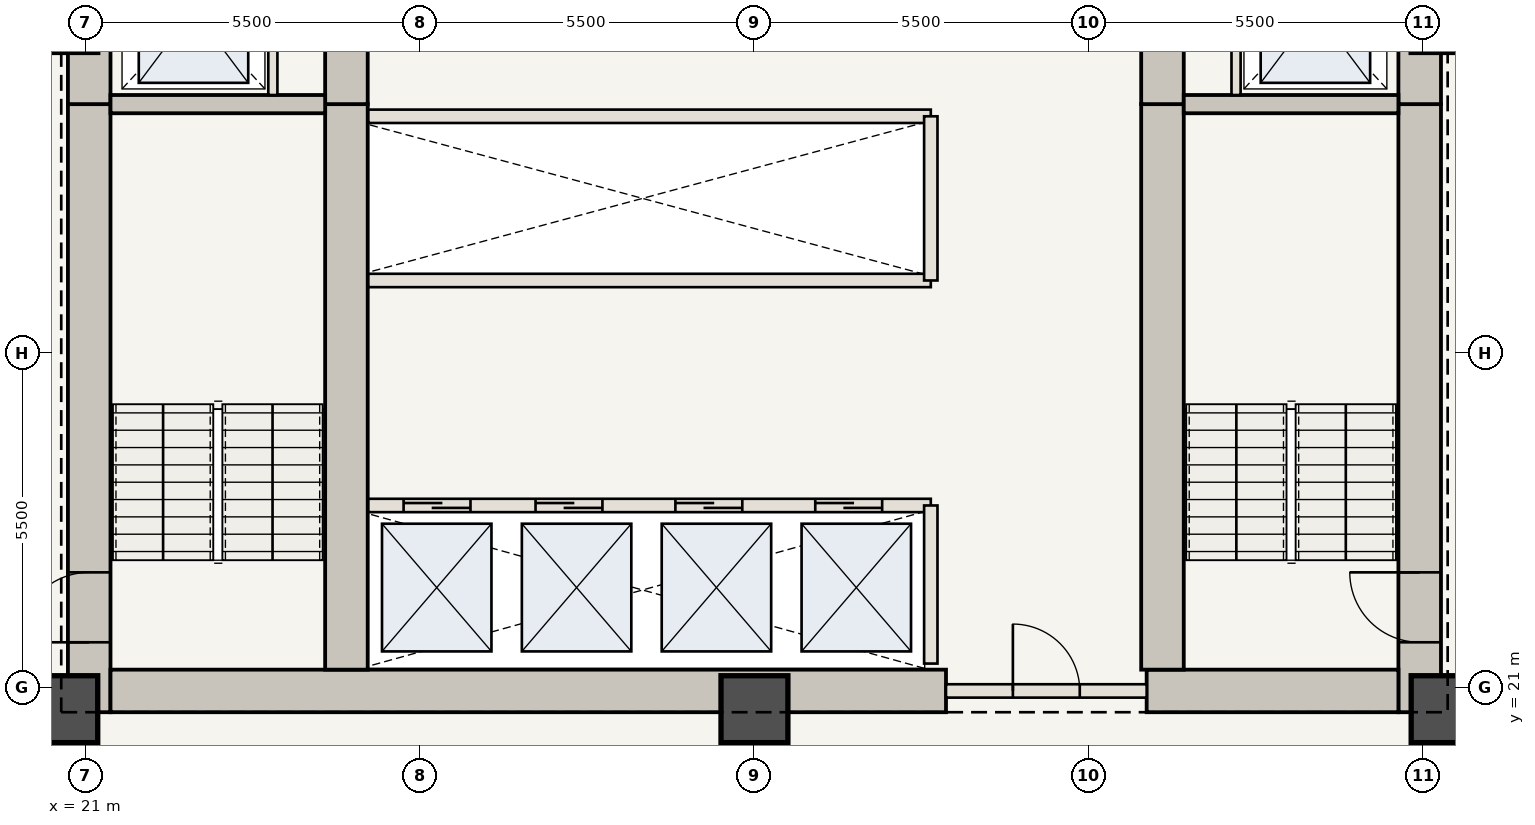
"""IFC4 building model, lengths in metres.
Left out: names, types, materials, properties, quantities, classifications, styles, units other than length and angle.
Written with IfcOpenShell. Run it as: python <this file> out.ifc"""

import sys

from ifc_helpers import new_model, si_unit, direction, frame, frame_2d, origin, origin_2d, place, context, subcontext, project, spatial, rectangle, extrude, element, fill, save


model = new_model("IFC4")
c1 = context("Model", 3, precision=1e-05, world=origin(), true_north=direction((0.0, 1.0)))
c2 = subcontext(c1, "Body", "Model", "MODEL_VIEW")
j1 = project(units=[si_unit("LENGTHUNIT", "METRE"), si_unit("PLANEANGLEUNIT", "RADIAN")], contexts=[c1])
p1 = place(None, origin())
s1 = spatial("IfcSite", under=j1, at=p1, CompositionType="ELEMENT")
p2 = place(p1, origin())
s2 = spatial("IfcBuilding", under=s1, at=p2, CompositionType="ELEMENT")
p3 = place(p2, frame((0.0, 0.0, 45.85)))
s3 = spatial("IfcBuildingStorey", under=s2, at=p3, CompositionType="ELEMENT", Elevation=45.85)
p4 = place(p3, frame((21.06, 20.6, 0.0), z_axis=(0.0, 0.0, 1.0), x_axis=(0.0, 1.0, 0.0)))
e1 = element("IfcWall", 1, at=p4, inside=s3, PredefinedType="SHEAR", context=c2, shape_type="SweptSolid", body=[
    extrude(rectangle(XDim=10.0, YDim=0.7, at=frame_2d((5.0, 0.0))), origin(), (0.0, 0.0, 1.0), 3.5),
])
p5 = place(p4, frame((1.15, 0.0, 0.0)))
e2 = element("IfcOpeningElement", 2, at=p5, cuts=e1, PredefinedType="OPENING", context=c2, shape_type="SweptSolid", body=[
    extrude(rectangle(XDim=1.15, YDim=2.15, at=frame_2d((0.575, 1.075))), frame((0.0, 0.36, 0.0), z_axis=(0.0, -1.0, 0.0), x_axis=(1.0, 0.0, 0.0)), (0.0, 0.0, 1.0), 0.72),
])
p6 = place(p3, frame((21.06, 30.6, 0.0), z_axis=(0.0, 0.0, 1.0), x_axis=(0.0, 1.0, 0.0)))
e3 = element("IfcWall", 3, at=p6, inside=s3, PredefinedType="SHEAR", context=c2, shape_type="SweptSolid", body=[
    extrude(rectangle(XDim=12.75, YDim=0.7, at=frame_2d((6.375, 0.0))), origin(), (0.0, 0.0, 1.0), 3.5),
])
p7 = place(p6, frame((4.2, 0.0, 0.0)))
e4 = element("IfcOpeningElement", 4, at=p7, cuts=e3, PredefinedType="OPENING", context=c2, shape_type="SweptSolid", body=[
    extrude(rectangle(XDim=1.1, YDim=2.15, at=frame_2d((0.55, 1.075))), frame((0.0, 0.36, 0.0), z_axis=(0.0, -1.0, 0.0), x_axis=(1.0, 0.0, 0.0)), (0.0, 0.0, 1.0), 0.72),
])
p8 = place(p6, frame((8.05, 0.0, 0.0)))
e5 = element("IfcOpeningElement", 5, at=p8, cuts=e3, PredefinedType="OPENING", context=c2, shape_type="SweptSolid", body=[
    extrude(rectangle(XDim=0.92, YDim=2.1, at=frame_2d((0.46, 1.05))), frame((0.0, 0.36, 0.0), z_axis=(0.0, -1.0, 0.0), x_axis=(1.0, 0.0, 0.0)), (0.0, 0.0, 1.0), 0.72),
])
p9 = place(p6, frame((9.45, 0.0, 0.0)))
e6 = element("IfcOpeningElement", 6, at=p9, cuts=e3, PredefinedType="OPENING", context=c2, shape_type="SweptSolid", body=[
    extrude(rectangle(XDim=0.88, YDim=2.1, at=frame_2d((0.44, 1.05))), frame((0.0, 0.36, 0.0), z_axis=(0.0, -1.0, 0.0), x_axis=(1.0, 0.0, 0.0)), (0.0, 0.0, 1.0), 0.72),
])
p10 = place(p6, frame((10.85, 0.0, 0.0)))
e7 = element("IfcOpeningElement", 7, at=p10, cuts=e3, PredefinedType="OPENING", context=c2, shape_type="SweptSolid", body=[
    extrude(rectangle(XDim=0.88, YDim=2.1, at=frame_2d((0.44, 1.05))), frame((0.0, 0.36, 0.0), z_axis=(0.0, -1.0, 0.0), x_axis=(1.0, 0.0, 0.0)), (0.0, 0.0, 1.0), 0.72),
])
p11 = place(p3, frame((42.94, 20.6, 0.0), z_axis=(0.0, 0.0, 1.0), x_axis=(0.0, 1.0, 0.0)))
e8 = element("IfcWall", 8, at=p11, inside=s3, PredefinedType="SHEAR", context=c2, shape_type="SweptSolid", body=[
    extrude(rectangle(XDim=10.0, YDim=0.7, at=frame_2d((5.0, 0.0))), origin(), (0.0, 0.0, 1.0), 3.5),
])
p12 = place(p11, frame((1.15, 0.0, 0.0)))
e9 = element("IfcOpeningElement", 9, at=p12, cuts=e8, PredefinedType="OPENING", context=c2, shape_type="SweptSolid", body=[
    extrude(rectangle(XDim=1.15, YDim=2.15, at=frame_2d((0.575, 1.075))), frame((0.0, 0.36, 0.0), z_axis=(0.0, -1.0, 0.0), x_axis=(1.0, 0.0, 0.0)), (0.0, 0.0, 1.0), 0.72),
])
p13 = place(p3, frame((42.94, 30.6, 0.0), z_axis=(0.0, 0.0, 1.0), x_axis=(0.0, 1.0, 0.0)))
e10 = element("IfcWall", 10, at=p13, inside=s3, PredefinedType="SHEAR", context=c2, shape_type="SweptSolid", body=[
    extrude(rectangle(XDim=12.75, YDim=0.7, at=frame_2d((6.375, 0.0))), origin(), (0.0, 0.0, 1.0), 3.5),
])
p14 = place(p13, frame((4.2, 0.0, 0.0)))
e11 = element("IfcOpeningElement", 11, at=p14, cuts=e10, PredefinedType="OPENING", context=c2, shape_type="SweptSolid", body=[
    extrude(rectangle(XDim=1.1, YDim=2.15, at=frame_2d((0.55, 1.075))), frame((0.0, 0.36, 0.0), z_axis=(0.0, -1.0, 0.0), x_axis=(1.0, 0.0, 0.0)), (0.0, 0.0, 1.0), 0.72),
])
p15 = place(p13, frame((9.2, 0.0, 0.0)))
e12 = element("IfcOpeningElement", 12, at=p15, cuts=e10, PredefinedType="OPENING", context=c2, shape_type="SweptSolid", body=[
    extrude(rectangle(XDim=0.92, YDim=2.1, at=frame_2d((0.46, 1.05))), frame((0.0, 0.36, 0.0), z_axis=(0.0, -1.0, 0.0), x_axis=(1.0, 0.0, 0.0)), (0.0, 0.0, 1.0), 0.72),
])
p16 = place(p3, frame((21.41, 20.95, 0.0), z_axis=(0.0, 0.0, 1.0), x_axis=(1.0, 0.0, 0.0)))
e13 = element("IfcWall", 13, at=p16, inside=s3, PredefinedType="SHEAR", context=c2, shape_type="SweptSolid", body=[
    extrude(rectangle(XDim=13.74, YDim=0.7, at=frame_2d((6.87, 0.0))), origin(), (0.0, 0.0, 1.0), 3.5),
])
p17 = place(p3, frame((38.45, 20.95, 0.0), z_axis=(0.0, 0.0, 1.0), x_axis=(1.0, 0.0, 0.0)))
e14 = element("IfcWall", 14, at=p17, inside=s3, PredefinedType="SHEAR", context=c2, shape_type="SweptSolid", body=[
    extrude(rectangle(XDim=4.14, YDim=0.7, at=frame_2d((2.07, 0.0))), origin(), (0.0, 0.0, 1.0), 3.5),
])
p18 = place(p3, frame((25.29, 21.3, 0.0), z_axis=(0.0, 0.0, 1.0), x_axis=(0.0, 1.0, 0.0)))
e15 = element("IfcWall", 15, at=p18, inside=s3, PredefinedType="SHEAR", context=c2, shape_type="SweptSolid", body=[
    extrude(rectangle(XDim=9.3, YDim=0.7, at=frame_2d((4.65, 0.0))), origin(), (0.0, 0.0, 1.0), 3.5),
])
p19 = place(p3, frame((25.29, 30.6, 0.0), z_axis=(0.0, 0.0, 1.0), x_axis=(0.0, 1.0, 0.0)))
e16 = element("IfcWall", 16, at=p19, inside=s3, PredefinedType="SHEAR", context=c2, shape_type="SweptSolid", body=[
    extrude(rectangle(XDim=12.05, YDim=0.7, at=frame_2d((6.025, 0.0))), origin(), (0.0, 0.0, 1.0), 3.5),
])
p20 = place(p19, frame((6.25, 0.0, 0.0)))
e17 = element("IfcOpeningElement", 17, at=p20, cuts=e16, PredefinedType="OPENING", context=c2, shape_type="SweptSolid", body=[
    extrude(rectangle(XDim=1.1, YDim=2.15, at=frame_2d((0.55, 1.075))), frame((0.0, 0.36, 0.0), z_axis=(0.0, -1.0, 0.0), x_axis=(1.0, 0.0, 0.0)), (0.0, 0.0, 1.0), 0.72),
])
p21 = place(p3, frame((38.71, 21.3, 0.0), z_axis=(0.0, 0.0, 1.0), x_axis=(0.0, 1.0, 0.0)))
e18 = element("IfcWall", 18, at=p21, inside=s3, PredefinedType="SHEAR", context=c2, shape_type="SweptSolid", body=[
    extrude(rectangle(XDim=9.3, YDim=0.7, at=frame_2d((4.65, 0.0))), origin(), (0.0, 0.0, 1.0), 3.5),
])
p22 = place(p3, frame((38.71, 30.6, 0.0), z_axis=(0.0, 0.0, 1.0), x_axis=(0.0, 1.0, 0.0)))
e19 = element("IfcWall", 19, at=p22, inside=s3, PredefinedType="SHEAR", context=c2, shape_type="SweptSolid", body=[
    extrude(rectangle(XDim=12.05, YDim=0.7, at=frame_2d((6.025, 0.0))), origin(), (0.0, 0.0, 1.0), 3.5),
])
for number, where, z_axis, x_axis in (
    (20, (20.65, 20.65, 0.0), (0.0, 0.0, 1.0), (1.0, 0.0, 0.0)),
    (21, (32.0, 20.65, 0.0), (0.0, 0.0, 1.0), (1.0, 0.0, 0.0)),
    (22, (43.35, 20.65, 0.0), (0.0, 0.0, 1.0), (1.0, 0.0, 0.0)),
):
    element("IfcColumn", number, at=place(p3, frame(where, z_axis=z_axis, x_axis=x_axis)), inside=s3, PredefinedType="COLUMN", context=c2, shape_type="SweptSolid", body=[
        extrude(rectangle(XDim=1.1, YDim=1.1, at=origin_2d()), origin(), (0.0, 0.0, 1.0), 3.5),
    ])
for number, where, z_axis, x_axis in (
    (23, (21.41, 30.6, 0.0), (0.0, 0.0, 1.0), (1.0, 0.0, 0.0)),
    (24, (39.06, 30.6, 0.0), (0.0, 0.0, 1.0), (1.0, 0.0, 0.0)),
):
    element("IfcWall", number, at=place(p3, frame(where, z_axis=z_axis, x_axis=x_axis)), inside=s3, PredefinedType="SHEAR", context=c2, shape_type="SweptSolid", body=[
        extrude(rectangle(XDim=3.53, YDim=0.3, at=frame_2d((1.765, 0.0))), origin(), (0.0, 0.0, 1.0), 3.32),
    ])
for number, where, z_axis, x_axis in (
    (25, (24.08, 30.75, 0.0), (0.0, 0.0, 1.0), (0.0, 1.0, 0.0)),
    (26, (39.92, 30.75, 0.0), (0.0, 0.0, 1.0), (0.0, 1.0, 0.0)),
):
    element("IfcWall", number, at=place(p3, frame(where, z_axis=z_axis, x_axis=x_axis)), inside=s3, PredefinedType="STANDARD", context=c2, shape_type="SweptSolid", body=[
        extrude(rectangle(XDim=2.65, YDim=0.15, at=frame_2d((1.325, 0.0))), origin(), (0.0, 0.0, 1.0), 3.32),
    ])
p23 = place(p3, frame((35.15, 20.95, 0.0), z_axis=(0.0, 0.0, 1.0), x_axis=(1.0, 0.0, 0.0)))
e27 = element("IfcWall", 27, at=p23, inside=s3, PredefinedType="STANDARD", context=c2, shape_type="SweptSolid", body=[
    extrude(rectangle(XDim=3.3, YDim=0.22, at=frame_2d((1.65, 0.0))), origin(), (0.0, 0.0, 1.0), 3.32),
])
p24 = place(p23, frame((1.1, 0.0, 0.0)))
e28 = element("IfcOpeningElement", 28, at=p24, cuts=e27, PredefinedType="OPENING", context=c2, shape_type="SweptSolid", body=[
    extrude(rectangle(XDim=1.1, YDim=2.15, at=frame_2d((0.55, 1.075))), frame((0.0, 0.12, 0.0), z_axis=(0.0, -1.0, 0.0), x_axis=(1.0, 0.0, 0.0)), (0.0, 0.0, 1.0), 0.24),
])
p25 = place(p3, frame((25.65, 24.0, 0.0), z_axis=(0.0, 0.0, 1.0), x_axis=(1.0, 0.0, 0.0)))
e29 = element("IfcWall", 29, at=p25, inside=s3, PredefinedType="STANDARD", context=c2, shape_type="SweptSolid", body=[
    extrude(rectangle(XDim=9.25, YDim=0.22, at=frame_2d((4.625, 0.0))), origin(), (0.0, 0.0, 1.0), 3.32),
])
p26 = place(p25, frame((0.58, 0.0, 0.0)))
e30 = element("IfcOpeningElement", 30, at=p26, cuts=e29, PredefinedType="OPENING", context=c2, shape_type="SweptSolid", body=[
    extrude(rectangle(XDim=1.1, YDim=2.15, at=frame_2d((0.55, 1.075))), frame((0.0, 0.12, 0.0), z_axis=(0.0, -1.0, 0.0), x_axis=(1.0, 0.0, 0.0)), (0.0, 0.0, 1.0), 0.24),
])
p27 = place(p25, frame((2.75, 0.0, 0.0)))
e31 = element("IfcOpeningElement", 31, at=p27, cuts=e29, PredefinedType="OPENING", context=c2, shape_type="SweptSolid", body=[
    extrude(rectangle(XDim=1.1, YDim=2.15, at=frame_2d((0.55, 1.075))), frame((0.0, 0.12, 0.0), z_axis=(0.0, -1.0, 0.0), x_axis=(1.0, 0.0, 0.0)), (0.0, 0.0, 1.0), 0.24),
])
p28 = place(p25, frame((5.05, 0.0, 0.0)))
e32 = element("IfcOpeningElement", 32, at=p28, cuts=e29, PredefinedType="OPENING", context=c2, shape_type="SweptSolid", body=[
    extrude(rectangle(XDim=1.1, YDim=2.15, at=frame_2d((0.55, 1.075))), frame((0.0, 0.12, 0.0), z_axis=(0.0, -1.0, 0.0), x_axis=(1.0, 0.0, 0.0)), (0.0, 0.0, 1.0), 0.24),
])
p29 = place(p25, frame((7.35, 0.0, 0.0)))
e33 = element("IfcOpeningElement", 33, at=p29, cuts=e29, PredefinedType="OPENING", context=c2, shape_type="SweptSolid", body=[
    extrude(rectangle(XDim=1.1, YDim=2.15, at=frame_2d((0.55, 1.075))), frame((0.0, 0.12, 0.0), z_axis=(0.0, -1.0, 0.0), x_axis=(1.0, 0.0, 0.0)), (0.0, 0.0, 1.0), 0.24),
])
p30 = place(p3, frame((34.9, 21.4, 0.0), z_axis=(0.0, 0.0, 1.0), x_axis=(0.0, 1.0, 0.0)))
e34 = element("IfcWall", 34, at=p30, inside=s3, PredefinedType="STANDARD", context=c2, shape_type="SweptSolid", body=[
    extrude(rectangle(XDim=2.6, YDim=0.22, at=frame_2d((1.3, 0.0))), origin(), (0.0, 0.0, 1.0), 3.32),
])
for number, where, z_axis, x_axis in (
    (35, (25.65, 27.7, 0.0), (0.0, 0.0, 1.0), (1.0, 0.0, 0.0)),
    (36, (25.65, 30.4, 0.0), (0.0, 0.0, 1.0), (1.0, 0.0, 0.0)),
):
    element("IfcWall", number, at=place(p3, frame(where, z_axis=z_axis, x_axis=x_axis)), inside=s3, PredefinedType="STANDARD", context=c2, shape_type="SweptSolid", body=[
        extrude(rectangle(XDim=9.25, YDim=0.22, at=frame_2d((4.625, 0.0))), origin(), (0.0, 0.0, 1.0), 3.32),
    ])
p31 = place(p3, frame((34.9, 27.7, 0.0), z_axis=(0.0, 0.0, 1.0), x_axis=(0.0, 1.0, 0.0)))
e37 = element("IfcWall", 37, at=p31, inside=s3, PredefinedType="STANDARD", context=c2, shape_type="SweptSolid", body=[
    extrude(rectangle(XDim=2.7, YDim=0.22, at=frame_2d((1.35, 0.0))), origin(), (0.0, 0.0, 1.0), 3.32),
])
p32 = place(p5, origin())
e38 = element("IfcDoor", 38, at=p32, inside=s3, OperationType="SINGLE_SWING_LEFT", PredefinedType="DOOR", context=c2, shape_type="SweptSolid", body=[
    extrude(rectangle(XDim=1.15, YDim=2.15, at=frame_2d((0.575, 1.075))), frame((0.0, 0.025, 0.0), z_axis=(0.0, -1.0, 0.0), x_axis=(1.0, 0.0, 0.0)), (0.0, 0.0, 1.0), 0.05),
])
fill(e2, e38)
p33 = place(p12, origin())
e39 = element("IfcDoor", 39, at=p33, inside=s3, OperationType="SINGLE_SWING_RIGHT", PredefinedType="DOOR", context=c2, shape_type="SweptSolid", body=[
    extrude(rectangle(XDim=1.15, YDim=2.15, at=frame_2d((0.575, 1.075))), frame((0.0, 0.025, 0.0), z_axis=(0.0, -1.0, 0.0), x_axis=(1.0, 0.0, 0.0)), (0.0, 0.0, 1.0), 0.05),
])
fill(e9, e39)
p34 = place(p24, origin())
e40 = element("IfcDoor", 40, at=p34, inside=s3, OperationType="SINGLE_SWING_LEFT", PredefinedType="DOOR", context=c2, shape_type="SweptSolid", body=[
    extrude(rectangle(XDim=1.1, YDim=2.15, at=frame_2d((0.55, 1.075))), frame((0.0, 0.025, 0.0), z_axis=(0.0, -1.0, 0.0), x_axis=(1.0, 0.0, 0.0)), (0.0, 0.0, 1.0), 0.05),
])
fill(e28, e40)
p35 = place(p26, origin())
e41 = element("IfcDoor", 41, at=p35, inside=s3, OperationType="DOUBLE_DOOR_SLIDING", PredefinedType="DOOR", context=c2, shape_type="SweptSolid", body=[
    extrude(rectangle(XDim=1.1, YDim=2.15, at=frame_2d((0.55, 1.075))), frame((0.0, 0.025, 0.0), z_axis=(0.0, -1.0, 0.0), x_axis=(1.0, 0.0, 0.0)), (0.0, 0.0, 1.0), 0.05),
])
fill(e30, e41)
p36 = place(p27, origin())
e42 = element("IfcDoor", 42, at=p36, inside=s3, OperationType="DOUBLE_DOOR_SLIDING", PredefinedType="DOOR", context=c2, shape_type="SweptSolid", body=[
    extrude(rectangle(XDim=1.1, YDim=2.15, at=frame_2d((0.55, 1.075))), frame((0.0, 0.025, 0.0), z_axis=(0.0, -1.0, 0.0), x_axis=(1.0, 0.0, 0.0)), (0.0, 0.0, 1.0), 0.05),
])
fill(e31, e42)
p37 = place(p28, origin())
e43 = element("IfcDoor", 43, at=p37, inside=s3, OperationType="DOUBLE_DOOR_SLIDING", PredefinedType="DOOR", context=c2, shape_type="SweptSolid", body=[
    extrude(rectangle(XDim=1.1, YDim=2.15, at=frame_2d((0.55, 1.075))), frame((0.0, 0.025, 0.0), z_axis=(0.0, -1.0, 0.0), x_axis=(1.0, 0.0, 0.0)), (0.0, 0.0, 1.0), 0.05),
])
fill(e32, e43)
p38 = place(p29, origin())
e44 = element("IfcDoor", 44, at=p38, inside=s3, OperationType="DOUBLE_DOOR_SLIDING", PredefinedType="DOOR", context=c2, shape_type="SweptSolid", body=[
    extrude(rectangle(XDim=1.1, YDim=2.15, at=frame_2d((0.55, 1.075))), frame((0.0, 0.025, 0.0), z_axis=(0.0, -1.0, 0.0), x_axis=(1.0, 0.0, 0.0)), (0.0, 0.0, 1.0), 0.05),
])
fill(e33, e44)
save(model, sys.argv[1])
